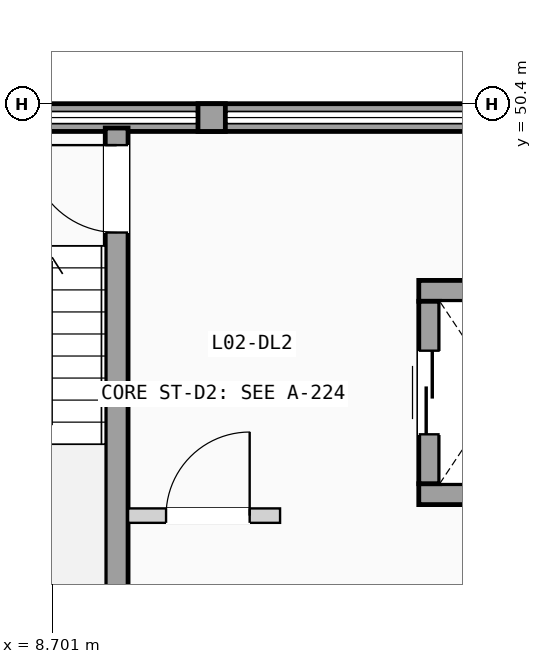
"""IFC4 building model, lengths in metres.
Left out: names, types, materials, properties, quantities, classifications, styles, units other than length and angle.
Written with IfcOpenShell. Run it as: python <this file> out.ifc"""

import sys

from ifc_helpers import new_model, si_unit, direction, frame, frame_2d, origin, place, context, subcontext, project, spatial, rectangle, extrude, element, fill, save


model = new_model("IFC4")
c1 = context("Model", 3, precision=1e-05, world=origin(), true_north=direction((0.0, 1.0)))
c2 = subcontext(c1, "Body", "Model", "MODEL_VIEW")
j1 = project(units=[si_unit("LENGTHUNIT", "METRE"), si_unit("PLANEANGLEUNIT", "RADIAN")], contexts=[c1])
p1 = place(None, origin())
s1 = spatial("IfcSite", under=j1, at=p1, CompositionType="ELEMENT")
p2 = place(p1, origin())
s2 = spatial("IfcBuilding", under=s1, at=p2, CompositionType="ELEMENT")
p3 = place(p2, frame((0.0, 0.0, 8.575)))
s3 = spatial("IfcBuildingStorey", under=s2, at=p3, CompositionType="ELEMENT", Elevation=8.575)
p4 = place(p3, frame((0.0, 50.218, 0.0), z_axis=(0.0, 0.0, 1.0), x_axis=(1.0, 0.0, 0.0)))
e1 = element("IfcWall", 1, at=p4, inside=s3, PredefinedType="SOLIDWALL", context=c2, shape_type="SweptSolid", body=[
    extrude(rectangle(XDim=21.6, YDim=0.365, at=frame_2d((10.8, 0.0))), origin(), (0.0, 0.0, 1.0), 1.11),
])
p5 = place(p3, frame((10.62, 50.218, 1.11), z_axis=(0.0, 0.0, 1.0), x_axis=(1.0, 0.0, 0.0)))
e2 = element("IfcWall", 2, at=p5, inside=s3, PredefinedType="SOLIDWALL", context=c2, shape_type="SweptSolid", body=[
    extrude(rectangle(XDim=0.36, YDim=0.365, at=frame_2d((0.18, 0.0))), origin(), (0.0, 0.0, 1.0), 2.13),
])
p6 = place(p3, frame((9.55, 43.08, 0.0), z_axis=(0.0, 0.0, 1.0), x_axis=(0.0, 1.0, 0.0)))
e3 = element("IfcWall", 3, at=p6, inside=s3, PredefinedType="SHEAR", context=c2, shape_type="SweptSolid", body=[
    extrude(rectangle(XDim=7.0, YDim=0.3, at=frame_2d((3.5, 0.0))), origin(), (0.0, 0.0, 1.0), 3.24),
])
p7 = place(p6, frame((5.625, 0.0, 0.0)))
e4 = element("IfcOpeningElement", 4, at=p7, cuts=e3, PredefinedType="OPENING", context=c2, shape_type="SweptSolid", body=[
    extrude(rectangle(XDim=1.15, YDim=2.12, at=frame_2d((0.575, 1.06))), frame((0.0, 0.16, 0.0), z_axis=(0.0, -1.0, 0.0), x_axis=(1.0, 0.0, 0.0)), (0.0, 0.0, 1.0), 0.32),
])
for number, where, z_axis, x_axis in (
    (5, (13.525, 45.262, 0.0), (0.0, 0.0, 1.0), (1.0, 0.0, 0.0)),
    (6, (13.525, 47.938, 0.0), (0.0, 0.0, 1.0), (1.0, 0.0, 0.0)),
):
    element("IfcWall", number, at=place(p3, frame(where, z_axis=z_axis, x_axis=x_axis)), inside=s3, PredefinedType="SHEAR", context=c2, shape_type="SweptSolid", body=[
        extrude(rectangle(XDim=2.15, YDim=0.275, at=frame_2d((1.075, 0.0))), origin(), (0.0, 0.0, 1.0), 3.24),
    ])
p8 = place(p3, frame((13.663, 45.4, 0.0), z_axis=(0.0, 0.0, 1.0), x_axis=(0.0, 1.0, 0.0)))
e7 = element("IfcWall", 7, at=p8, inside=s3, PredefinedType="SHEAR", context=c2, shape_type="SweptSolid", body=[
    extrude(rectangle(XDim=2.4, YDim=0.275, at=frame_2d((1.2, 0.0))), origin(), (0.0, 0.0, 1.0), 3.24),
])
p9 = place(p8, frame((0.65, 0.0, 0.0)))
e8 = element("IfcOpeningElement", 8, at=p9, cuts=e7, PredefinedType="OPENING", context=c2, shape_type="SweptSolid", body=[
    extrude(rectangle(XDim=1.1, YDim=2.15, at=frame_2d((0.55, 1.075))), frame((0.0, 0.147, 0.0), z_axis=(0.0, -1.0, 0.0), x_axis=(1.0, 0.0, 0.0)), (0.0, 0.0, 1.0), 0.295),
])
p10 = place(p3, frame((9.7, 44.98, 0.0), z_axis=(0.0, 0.0, 1.0), x_axis=(1.0, 0.0, 0.0)))
e9 = element("IfcWall", 9, at=p10, inside=s3, PredefinedType="PARTITIONING", context=c2, shape_type="SweptSolid", body=[
    extrude(rectangle(XDim=2.0, YDim=0.19, at=frame_2d((1.0, 0.0))), origin(), (0.0, 0.0, 1.0), 3.22),
])
p11 = place(p10, frame((0.5, 0.0, 0.0)))
e10 = element("IfcOpeningElement", 10, at=p11, cuts=e9, PredefinedType="OPENING", context=c2, shape_type="SweptSolid", body=[
    extrude(rectangle(XDim=1.1, YDim=2.12, at=frame_2d((0.55, 1.06))), frame((0.0, 0.105, 0.0), z_axis=(0.0, -1.0, 0.0), x_axis=(1.0, 0.0, 0.0)), (0.0, 0.0, 1.0), 0.21),
])
p12 = place(p7, origin())
e11 = element("IfcDoor", 11, at=p12, inside=s3, OperationType="SINGLE_SWING_RIGHT", PredefinedType="DOOR", context=c2, shape_type="SweptSolid", body=[
    extrude(rectangle(XDim=1.15, YDim=2.12, at=frame_2d((0.575, 1.06))), frame((0.0, 0.025, 0.0), z_axis=(0.0, -1.0, 0.0), x_axis=(1.0, 0.0, 0.0)), (0.0, 0.0, 1.0), 0.05),
])
fill(e4, e11)
p13 = place(p9, origin())
e12 = element("IfcDoor", 12, at=p13, inside=s3, OperationType="SLIDING_TO_LEFT", PredefinedType="DOOR", context=c2, shape_type="SweptSolid", body=[
    extrude(rectangle(XDim=1.1, YDim=2.15, at=frame_2d((0.55, 1.075))), frame((0.0, 0.025, 0.0), z_axis=(0.0, -1.0, 0.0), x_axis=(1.0, 0.0, 0.0)), (0.0, 0.0, 1.0), 0.05),
])
fill(e8, e12)
p14 = place(p11, origin())
e13 = element("IfcDoor", 13, at=p14, inside=s3, OperationType="SINGLE_SWING_RIGHT", PredefinedType="DOOR", context=c2, shape_type="SweptSolid", body=[
    extrude(rectangle(XDim=1.1, YDim=2.12, at=frame_2d((0.55, 1.06))), frame((0.0, 0.025, 0.0), z_axis=(0.0, -1.0, 0.0), x_axis=(1.0, 0.0, 0.0)), (0.0, 0.0, 1.0), 0.05),
])
fill(e10, e13)
save(model, sys.argv[1])
